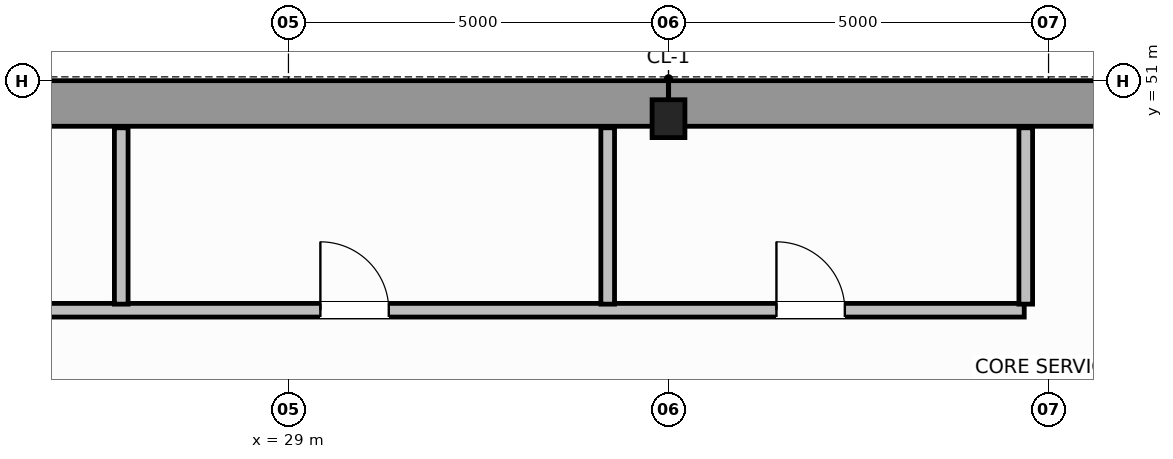
"""IFC4 building model, lengths in metres.
Left out: names, types, materials, properties, quantities, classifications, styles, units other than length and angle.
Written with IfcOpenShell. Run it as: python <this file> out.ifc"""

import sys

from ifc_helpers import new_model, si_unit, direction, frame, frame_2d, origin, origin_2d, place, context, subcontext, project, spatial, rectangle, i_section, extrude, source, transform, mapped, element, fill, save


model = new_model("IFC4")
c1 = context("Model", 3, precision=1e-05, world=origin(), true_north=direction((0.0, 1.0)))
c2 = subcontext(c1, "Body", "Model", "MODEL_VIEW")
j1 = project(units=[si_unit("LENGTHUNIT", "METRE"), si_unit("PLANEANGLEUNIT", "RADIAN")], contexts=[c1])
p1 = place(None, origin())
s1 = spatial("IfcSite", under=j1, at=p1, CompositionType="ELEMENT")
p2 = place(p1, origin())
s2 = spatial("IfcBuilding", under=s1, at=p2, CompositionType="ELEMENT")
p3 = place(p2, frame((0.0, 0.0, 180.4)))
s3 = spatial("IfcBuildingStorey", under=s2, at=p3, CompositionType="ELEMENT", Elevation=180.4)
m1 = source(origin(), c2, "Body", "SweptSolid", [
    extrude(i_section(OverallWidth=0.432, OverallDepth=0.498, WebThickness=0.055, FlangeThickness=0.068, FilletRadius=0.015, at=origin_2d()), origin(), (0.0, 0.0, 1.0), 3.8),
])
p4 = place(p3, frame((34.0, 50.5, 0.0), z_axis=(0.0, 0.0, 1.0), x_axis=(1.0, 0.0, 0.0)))
e1 = element("IfcColumn", 1, at=p4, inside=s3, PredefinedType="COLUMN", context=c2, shape_type="MappedRepresentation", body=[
    mapped(m1, transform((0.0, 0.0, 0.0), scale=1.0)),
])
for number, where, z_axis, x_axis in (
    (2, (14.304, 50.7, 0.0), (0.0, 0.0, 1.0), (1.0, 0.0, 0.0)),
    (3, (34.002, 50.7, 0.0), (0.0, 0.0, 1.0), (1.0, 0.0, 0.0)),
):
    element("IfcWall", number, at=place(p3, frame(where, z_axis=z_axis, x_axis=x_axis)), inside=s3, PredefinedType="SHEAR", context=c2, shape_type="SweptSolid", body=[
        extrude(rectangle(XDim=19.694, YDim=0.6, at=frame_2d((9.847, 0.0))), origin(), (0.0, 0.0, 1.0), 3.8),
    ])
p5 = place(p3, frame((18.62, 47.98, 0.0), z_axis=(0.0, 0.0, 1.0), x_axis=(1.0, 0.0, 0.0)))
e4 = element("IfcWall", 4, at=p5, inside=s3, PredefinedType="PLUMBINGWALL", context=c2, shape_type="SweptSolid", body=[
    extrude(rectangle(XDim=20.06, YDim=0.18, at=frame_2d((10.03, 0.0))), origin(), (0.0, 0.0, 1.0), 3.58),
])
p6 = place(p5, frame((3.5, 0.0, 0.0)))
e5 = element("IfcOpeningElement", 5, at=p6, cuts=e4, PredefinedType="OPENING", context=c2, shape_type="SweptSolid", body=[
    extrude(rectangle(XDim=0.9, YDim=2.15, at=frame_2d((0.45, 1.075))), frame((0.0, 0.1, 0.0), z_axis=(0.0, -1.0, 0.0), x_axis=(1.0, 0.0, 0.0)), (0.0, 0.0, 1.0), 0.2),
])
p7 = place(p5, frame((10.8, 0.0, 0.0)))
e6 = element("IfcOpeningElement", 6, at=p7, cuts=e4, PredefinedType="OPENING", context=c2, shape_type="SweptSolid", body=[
    extrude(rectangle(XDim=0.9, YDim=2.15, at=frame_2d((0.45, 1.075))), frame((0.0, 0.1, 0.0), z_axis=(0.0, -1.0, 0.0), x_axis=(1.0, 0.0, 0.0)), (0.0, 0.0, 1.0), 0.2),
])
p8 = place(p5, frame((16.8, 0.0, 0.0)))
e7 = element("IfcOpeningElement", 7, at=p8, cuts=e4, PredefinedType="OPENING", context=c2, shape_type="SweptSolid", body=[
    extrude(rectangle(XDim=0.9, YDim=2.15, at=frame_2d((0.45, 1.075))), frame((0.0, 0.1, 0.0), z_axis=(0.0, -1.0, 0.0), x_axis=(1.0, 0.0, 0.0)), (0.0, 0.0, 1.0), 0.2),
])
for number, where, z_axis, x_axis in (
    (8, (26.8, 48.06, 0.0), (0.0, 0.0, 1.0), (0.0, 1.0, 0.0)),
    (9, (33.2, 48.06, 0.0), (0.0, 0.0, 1.0), (0.0, 1.0, 0.0)),
    (10, (38.7, 48.06, 0.0), (0.0, 0.0, 1.0), (0.0, 1.0, 0.0)),
):
    element("IfcWall", number, at=place(p3, frame(where, z_axis=z_axis, x_axis=x_axis)), inside=s3, PredefinedType="PLUMBINGWALL", context=c2, shape_type="SweptSolid", body=[
        extrude(rectangle(XDim=2.32, YDim=0.18, at=frame_2d((1.16, 0.0))), origin(), (0.0, 0.0, 1.0), 3.58),
    ])
m2 = source(origin(), c2, "Body", "SweptSolid", [
    extrude(rectangle(XDim=0.9, YDim=2.15, at=frame_2d((0.45, 1.075))), frame((0.0, 0.025, 0.0), z_axis=(0.0, -1.0, 0.0), x_axis=(1.0, 0.0, 0.0)), (0.0, 0.0, 1.0), 0.05),
])
p9 = place(p7, origin())
e11 = element("IfcDoor", 11, at=p9, inside=s3, OperationType="SINGLE_SWING_RIGHT", PredefinedType="DOOR", context=c2, shape_type="MappedRepresentation", body=[
    mapped(m2, transform((0.0, 0.0, 0.0), scale=1.0)),
])
fill(e6, e11)
p10 = place(p8, origin())
e12 = element("IfcDoor", 12, at=p10, inside=s3, OperationType="SINGLE_SWING_LEFT", PredefinedType="DOOR", context=c2, shape_type="MappedRepresentation", body=[
    mapped(m2, transform((0.0, 0.0, 0.0), scale=1.0)),
])
fill(e7, e12)
save(model, sys.argv[1])
